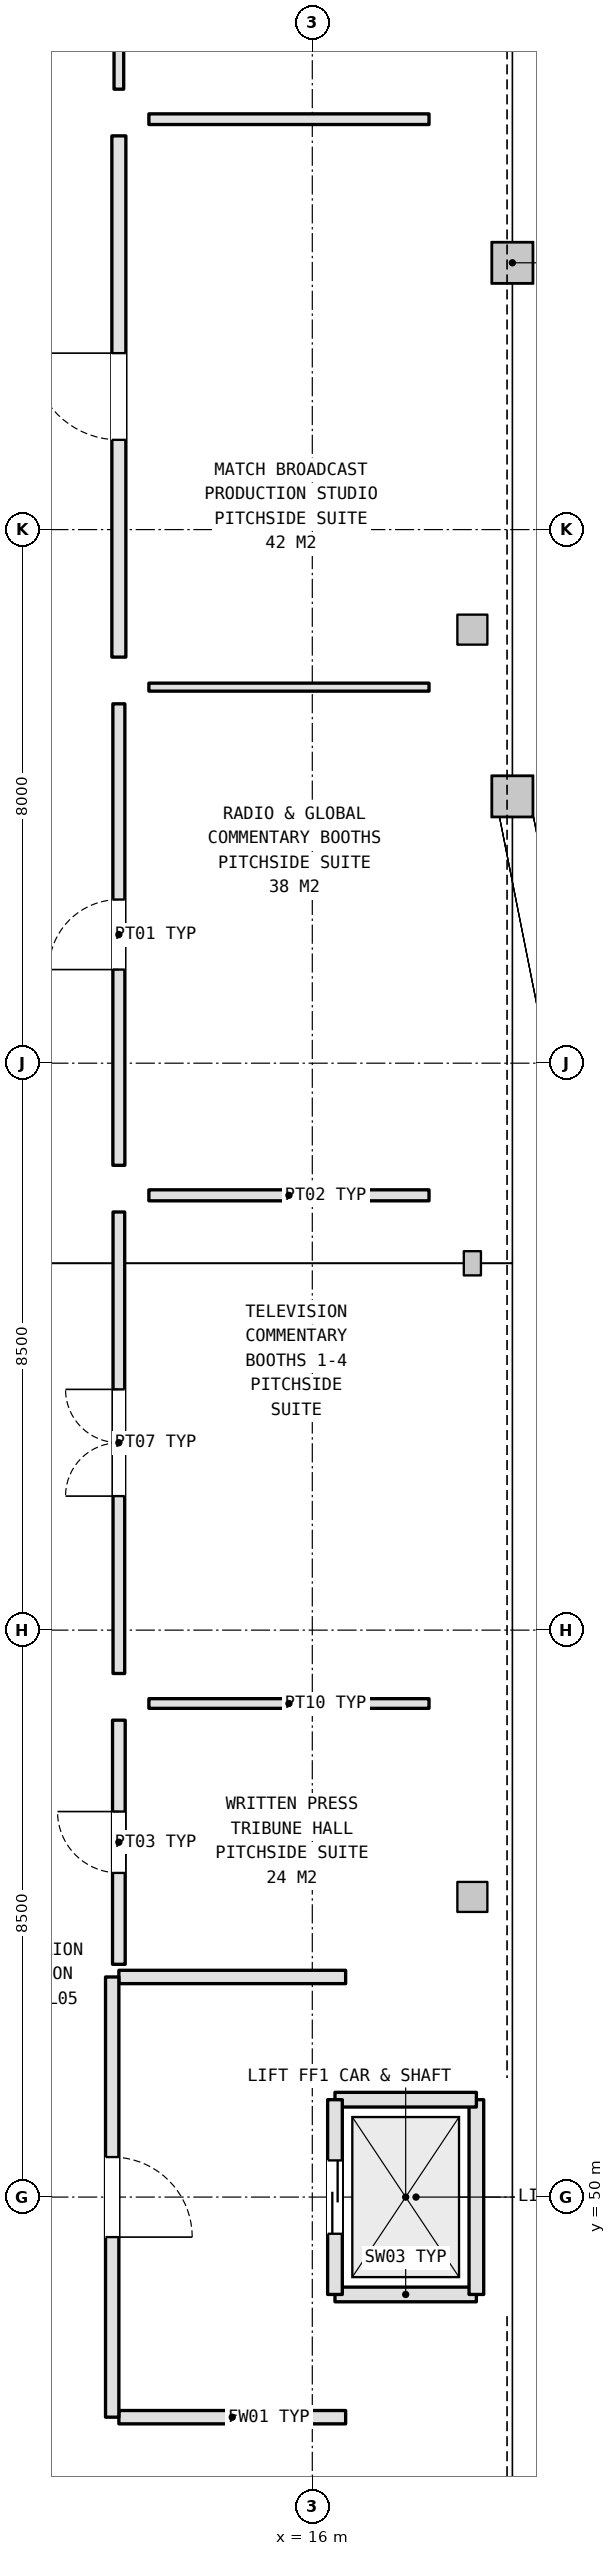
"""IFC4 building model, lengths in metres.
Left out: names, types, materials, properties, quantities, classifications, styles, units other than length and angle.
Written with IfcOpenShell. Run it as: python <this file> out.ifc"""

import sys

from ifc_helpers import new_model, si_unit, direction, frame, frame_2d, origin, origin_2d, place, context, subcontext, project, spatial, rectangle, hollow_circle, i_section, extrude, element, fill, save


model = new_model("IFC4")
c1 = context("Model", 3, precision=1e-05, world=origin(), true_north=direction((0.0, 1.0)))
c2 = subcontext(c1, "Body", "Model", "MODEL_VIEW")
j1 = project(units=[si_unit("LENGTHUNIT", "METRE"), si_unit("PLANEANGLEUNIT", "RADIAN")], contexts=[c1])
p1 = place(None, origin())
s1 = spatial("IfcSite", under=j1, at=p1, CompositionType="ELEMENT")
p2 = place(p1, origin())
s2 = spatial("IfcBuilding", under=s1, at=p2, CompositionType="ELEMENT")
p3 = place(p2, frame((0.0, 0.0, 27.0)))
s3 = spatial("IfcBuildingStorey", under=s2, at=p3, CompositionType="ELEMENT", Elevation=27.0)
for number, where, z_axis, x_axis in (
    (1, (19.0, 79.0, 0.0), (0.0, 0.0, 1.0), (1.0, 0.0, 0.0)),
    (2, (19.0, 71.0, 0.0), (0.0, 0.0, 1.0), (1.0, 0.0, 0.0)),
):
    element("IfcColumn", number, at=place(p3, frame(where, z_axis=z_axis, x_axis=x_axis)), inside=s3, PredefinedType="PILASTER", context=c2, shape_type="SweptSolid", body=[
        extrude(hollow_circle(Radius=0.305, WallThickness=0.025, at=origin_2d()), origin(), (0.0, 0.0, 1.0), 4.8),
    ])
p4 = place(p3, frame((18.4, 54.5, 0.0), z_axis=(0.0, 0.0, 1.0), x_axis=(1.0, 0.0, 0.0)))
e3 = element("IfcColumn", 3, at=p4, inside=s3, PredefinedType="COLUMN", context=c2, shape_type="SweptSolid", body=[
    extrude(rectangle(XDim=0.45, YDim=0.45, at=origin_2d()), origin(), (0.0, 0.0, 1.0), 6.186),
])
p5 = place(p3, frame((18.4, 64.0, 0.0), z_axis=(0.0, 0.0, 1.0), x_axis=(1.0, 0.0, 0.0)))
e4 = element("IfcColumn", 4, at=p5, inside=s3, PredefinedType="COLUMN", context=c2, shape_type="SweptSolid", body=[
    extrude(i_section(OverallWidth=0.257, OverallDepth=0.363, WebThickness=0.013, FlangeThickness=0.022, FilletRadius=0.015, at=origin_2d()), origin(), (0.0, 0.0, 1.0), 6.186),
])
p6 = place(p3, frame((18.4, 73.5, 0.0), z_axis=(0.0, 0.0, 1.0), x_axis=(1.0, 0.0, 0.0)))
e5 = element("IfcColumn", 5, at=p6, inside=s3, PredefinedType="COLUMN", context=c2, shape_type="SweptSolid", body=[
    extrude(rectangle(XDim=0.45, YDim=0.45, at=origin_2d()), origin(), (0.0, 0.0, 1.0), 6.186),
])
p7 = place(p3, frame((16.34, 48.54, 0.0), z_axis=(0.0, 0.0, 1.0), x_axis=(1.0, 0.0, 0.0)))
e6 = element("IfcWall", 6, at=p7, inside=s3, PredefinedType="SHEAR", context=c2, shape_type="SweptSolid", body=[
    extrude(rectangle(XDim=2.12, YDim=0.22, at=frame_2d((1.06, 0.0))), origin(), (0.0, 0.0, 1.0), 4.62),
])
p8 = place(p3, frame((18.46, 48.54, 0.0), z_axis=(0.0, 0.0, 1.0), x_axis=(0.0, 1.0, 0.0)))
e7 = element("IfcWall", 7, at=p8, inside=s3, PredefinedType="SHEAR", context=c2, shape_type="SweptSolid", body=[
    extrude(rectangle(XDim=2.92, YDim=0.22, at=frame_2d((1.46, 0.0))), origin(), (0.0, 0.0, 1.0), 4.62),
])
p9 = place(p3, frame((18.46, 51.46, 0.0), z_axis=(0.0, 0.0, 1.0), x_axis=(-1.0, 0.0, 0.0)))
e8 = element("IfcWall", 8, at=p9, inside=s3, PredefinedType="SHEAR", context=c2, shape_type="SweptSolid", body=[
    extrude(rectangle(XDim=2.12, YDim=0.22, at=frame_2d((1.06, 0.0))), origin(), (0.0, 0.0, 1.0), 4.62),
])
p10 = place(p3, frame((16.34, 51.46, 0.0), z_axis=(0.0, 0.0, 1.0), x_axis=(0.0, -1.0, 0.0)))
e9 = element("IfcWall", 9, at=p10, inside=s3, PredefinedType="SHEAR", context=c2, shape_type="SweptSolid", body=[
    extrude(rectangle(XDim=2.92, YDim=0.22, at=frame_2d((1.46, 0.0))), origin(), (0.0, 0.0, 1.0), 4.62),
])
p11 = place(p10, frame((0.91, 0.0, 0.0)))
e10 = element("IfcOpeningElement", 10, at=p11, cuts=e9, PredefinedType="OPENING", context=c2, shape_type="SweptSolid", body=[
    extrude(rectangle(XDim=1.1, YDim=2.2, at=frame_2d((0.55, 1.1))), frame((0.0, 0.12, 0.0), z_axis=(0.0, -1.0, 0.0), x_axis=(1.0, 0.0, 0.0)), (0.0, 0.0, 1.0), 0.24),
])
for number, where, z_axis, x_axis in (
    (11, (13.1, 46.7, 0.0), (0.0, 0.0, 1.0), (1.0, 0.0, 0.0)),
    (12, (16.5, 53.3, 0.0), (0.0, 0.0, 1.0), (-1.0, 0.0, 0.0)),
):
    element("IfcWall", number, at=place(p3, frame(where, z_axis=z_axis, x_axis=x_axis)), inside=s3, PredefinedType="SOLIDWALL", context=c2, shape_type="SweptSolid", body=[
        extrude(rectangle(XDim=3.4, YDim=0.2, at=frame_2d((1.7, 0.0))), origin(), (0.0, 0.0, 1.0), 3.3),
    ])
p12 = place(p3, frame((13.0, 53.3, 0.0), z_axis=(0.0, 0.0, 1.0), x_axis=(0.0, -1.0, 0.0)))
e13 = element("IfcWall", 13, at=p12, inside=s3, PredefinedType="SOLIDWALL", context=c2, shape_type="SweptSolid", body=[
    extrude(rectangle(XDim=6.6, YDim=0.2, at=frame_2d((3.3, 0.0))), origin(), (0.0, 0.0, 1.0), 3.3),
])
p13 = place(p12, frame((2.7, 0.0, 0.0)))
e14 = element("IfcOpeningElement", 14, at=p13, cuts=e13, PredefinedType="OPENING", context=c2, shape_type="SweptSolid", body=[
    extrude(rectangle(XDim=1.2, YDim=2.2, at=frame_2d((0.6, 1.1))), frame((0.0, 0.11, 0.0), z_axis=(0.0, -1.0, 0.0), x_axis=(1.0, 0.0, 0.0)), (0.0, 0.0, 1.0), 0.22),
])
p14 = place(p3, frame((13.1, 53.49, 0.0), z_axis=(0.0, 0.0, 1.0), x_axis=(0.0, 1.0, 0.0)))
e15 = element("IfcWall", 15, at=p14, inside=s3, PredefinedType="PARTITIONING", context=c2, shape_type="SweptSolid", body=[
    extrude(rectangle(XDim=3.66, YDim=0.19, at=frame_2d((1.83, 0.0))), origin(), (0.0, 0.0, 1.0), 3.5),
])
p15 = place(p14, frame((1.37, 0.0, 0.0)))
e16 = element("IfcOpeningElement", 16, at=p15, cuts=e15, PredefinedType="OPENING", context=c2, shape_type="SweptSolid", body=[
    extrude(rectangle(XDim=0.92, YDim=2.1, at=frame_2d((0.46, 1.05))), frame((0.0, 0.105, 0.0), z_axis=(0.0, -1.0, 0.0), x_axis=(1.0, 0.0, 0.0)), (0.0, 0.0, 1.0), 0.21),
])
p16 = place(p3, frame((13.55, 57.4, 0.0), z_axis=(0.0, 0.0, 1.0), x_axis=(1.0, 0.0, 0.0)))
e17 = element("IfcWall", 17, at=p16, inside=s3, PredefinedType="PARTITIONING", context=c2, shape_type="SweptSolid", body=[
    extrude(rectangle(XDim=4.2, YDim=0.145, at=frame_2d((2.1, 0.0))), origin(), (0.0, 0.0, 1.0), 3.5),
])
p17 = place(p3, frame((13.1, 57.85, 0.0), z_axis=(0.0, 0.0, 1.0), x_axis=(0.0, 1.0, 0.0)))
e18 = element("IfcWall", 18, at=p17, inside=s3, PredefinedType="PARTITIONING", context=c2, shape_type="SweptSolid", body=[
    extrude(rectangle(XDim=6.919, YDim=0.175, at=frame_2d((3.459, 0.0))), origin(), (0.0, 0.0, 1.0), 3.5),
])
p18 = place(p17, frame((2.659, 0.0, 0.0)))
e19 = element("IfcOpeningElement", 19, at=p18, cuts=e18, PredefinedType="OPENING", context=c2, shape_type="SweptSolid", body=[
    extrude(rectangle(XDim=1.6, YDim=2.2, at=frame_2d((0.8, 1.1))), frame((0.0, 0.097, 0.0), z_axis=(0.0, -1.0, 0.0), x_axis=(1.0, 0.0, 0.0)), (0.0, 0.0, 1.0), 0.195),
])
p19 = place(p3, frame((13.55, 65.019, 0.0), z_axis=(0.0, 0.0, 1.0), x_axis=(1.0, 0.0, 0.0)))
e20 = element("IfcWall", 20, at=p19, inside=s3, PredefinedType="PARTITIONING", context=c2, shape_type="SweptSolid", body=[
    extrude(rectangle(XDim=4.2, YDim=0.165, at=frame_2d((2.1, 0.0))), origin(), (0.0, 0.0, 1.0), 3.5),
])
p20 = place(p3, frame((13.1, 65.469, 0.0), z_axis=(0.0, 0.0, 1.0), x_axis=(0.0, 1.0, 0.0)))
e21 = element("IfcWall", 21, at=p20, inside=s3, PredefinedType="PARTITIONING", context=c2, shape_type="SweptSolid", body=[
    extrude(rectangle(XDim=6.919, YDim=0.18, at=frame_2d((3.459, 0.0))), origin(), (0.0, 0.0, 1.0), 3.5),
])
p21 = place(p20, frame((2.935, 0.0, 0.0)))
e22 = element("IfcOpeningElement", 22, at=p21, cuts=e21, PredefinedType="OPENING", context=c2, shape_type="SweptSolid", body=[
    extrude(rectangle(XDim=1.05, YDim=2.2, at=frame_2d((0.525, 1.1))), frame((0.0, 0.1, 0.0), z_axis=(0.0, -1.0, 0.0), x_axis=(1.0, 0.0, 0.0)), (0.0, 0.0, 1.0), 0.2),
])
p22 = place(p3, frame((13.55, 72.638, 0.0), z_axis=(0.0, 0.0, 1.0), x_axis=(1.0, 0.0, 0.0)))
e23 = element("IfcWall", 23, at=p22, inside=s3, PredefinedType="PARTITIONING", context=c2, shape_type="SweptSolid", body=[
    extrude(rectangle(XDim=4.2, YDim=0.12, at=frame_2d((2.1, 0.0))), origin(), (0.0, 0.0, 1.0), 3.5),
])
p23 = place(p3, frame((13.1, 73.088, 0.0), z_axis=(0.0, 0.0, 1.0), x_axis=(0.0, 1.0, 0.0)))
e24 = element("IfcWall", 24, at=p23, inside=s3, PredefinedType="PLUMBINGWALL", context=c2, shape_type="SweptSolid", body=[
    extrude(rectangle(XDim=7.815, YDim=0.21, at=frame_2d((3.908, 0.0))), origin(), (0.0, 0.0, 1.0), 3.5),
])
p24 = place(p23, frame((3.258, 0.0, 0.0)))
e25 = element("IfcOpeningElement", 25, at=p24, cuts=e24, PredefinedType="OPENING", context=c2, shape_type="SweptSolid", body=[
    extrude(rectangle(XDim=1.3, YDim=2.2, at=frame_2d((0.65, 1.1))), frame((0.0, 0.115, 0.0), z_axis=(0.0, -1.0, 0.0), x_axis=(1.0, 0.0, 0.0)), (0.0, 0.0, 1.0), 0.23),
])
p25 = place(p3, frame((13.55, 81.153, 0.0), z_axis=(0.0, 0.0, 1.0), x_axis=(1.0, 0.0, 0.0)))
e26 = element("IfcWall", 26, at=p25, inside=s3, PredefinedType="PARTITIONING", context=c2, shape_type="SweptSolid", body=[
    extrude(rectangle(XDim=4.2, YDim=0.16, at=frame_2d((2.1, 0.0))), origin(), (0.0, 0.0, 1.0), 3.5),
])
p26 = place(p3, frame((13.1, 81.603, 0.0), z_axis=(0.0, 0.0, 1.0), x_axis=(0.0, 1.0, 0.0)))
e27 = element("IfcWall", 27, at=p26, inside=s3, PredefinedType="PARTITIONING", context=c2, shape_type="SweptSolid", body=[
    extrude(rectangle(XDim=6.47, YDim=0.145, at=frame_2d((3.235, 0.0))), origin(), (0.0, 0.0, 1.0), 3.5),
])
p27 = place(p26, frame((2.675, 0.0, 0.0)))
e28 = element("IfcOpeningElement", 28, at=p27, cuts=e27, PredefinedType="OPENING", context=c2, shape_type="SweptSolid", body=[
    extrude(rectangle(XDim=1.12, YDim=2.2, at=frame_2d((0.56, 1.1))), frame((0.0, 0.083, 0.0), z_axis=(0.0, -1.0, 0.0), x_axis=(1.0, 0.0, 0.0)), (0.0, 0.0, 1.0), 0.165),
])
p28 = place(p11, origin())
e29 = element("IfcDoor", 29, at=p28, inside=s3, OperationType="DOUBLE_DOOR_SLIDING", PredefinedType="DOOR", context=c2, shape_type="SweptSolid", body=[
    extrude(rectangle(XDim=1.1, YDim=2.2, at=frame_2d((0.55, 1.1))), frame((0.0, 0.025, 0.0), z_axis=(0.0, -1.0, 0.0), x_axis=(1.0, 0.0, 0.0)), (0.0, 0.0, 1.0), 0.05),
])
fill(e10, e29)
p29 = place(p13, origin())
e30 = element("IfcDoor", 30, at=p29, inside=s3, OperationType="SINGLE_SWING_RIGHT", PredefinedType="DOOR", context=c2, shape_type="SweptSolid", body=[
    extrude(rectangle(XDim=1.2, YDim=2.2, at=frame_2d((0.6, 1.1))), frame((0.0, 0.025, 0.0), z_axis=(0.0, -1.0, 0.0), x_axis=(1.0, 0.0, 0.0)), (0.0, 0.0, 1.0), 0.05),
])
fill(e14, e30)
p30 = place(p15, origin())
e31 = element("IfcDoor", 31, at=p30, inside=s3, OperationType="SINGLE_SWING_RIGHT", PredefinedType="DOOR", context=c2, shape_type="SweptSolid", body=[
    extrude(rectangle(XDim=0.92, YDim=2.1, at=frame_2d((0.46, 1.05))), frame((0.0, 0.025, 0.0), z_axis=(0.0, -1.0, 0.0), x_axis=(1.0, 0.0, 0.0)), (0.0, 0.0, 1.0), 0.05),
])
fill(e16, e31)
p31 = place(p18, origin())
e32 = element("IfcDoor", 32, at=p31, inside=s3, OperationType="DOUBLE_DOOR_SINGLE_SWING", PredefinedType="DOOR", context=c2, shape_type="SweptSolid", body=[
    extrude(rectangle(XDim=1.6, YDim=2.2, at=frame_2d((0.8, 1.1))), frame((0.0, 0.025, 0.0), z_axis=(0.0, -1.0, 0.0), x_axis=(1.0, 0.0, 0.0)), (0.0, 0.0, 1.0), 0.05),
])
fill(e19, e32)
p32 = place(p21, origin())
e33 = element("IfcDoor", 33, at=p32, inside=s3, OperationType="SINGLE_SWING_LEFT", PredefinedType="DOOR", context=c2, shape_type="SweptSolid", body=[
    extrude(rectangle(XDim=1.05, YDim=2.2, at=frame_2d((0.525, 1.1))), frame((0.0, 0.025, 0.0), z_axis=(0.0, -1.0, 0.0), x_axis=(1.0, 0.0, 0.0)), (0.0, 0.0, 1.0), 0.05),
])
fill(e22, e33)
p33 = place(p24, origin())
e34 = element("IfcDoor", 34, at=p33, inside=s3, OperationType="SINGLE_SWING_RIGHT", PredefinedType="DOOR", context=c2, shape_type="SweptSolid", body=[
    extrude(rectangle(XDim=1.3, YDim=2.2, at=frame_2d((0.65, 1.1))), frame((0.0, 0.025, 0.0), z_axis=(0.0, -1.0, 0.0), x_axis=(1.0, 0.0, 0.0)), (0.0, 0.0, 1.0), 0.05),
])
fill(e25, e34)
save(model, sys.argv[1])
